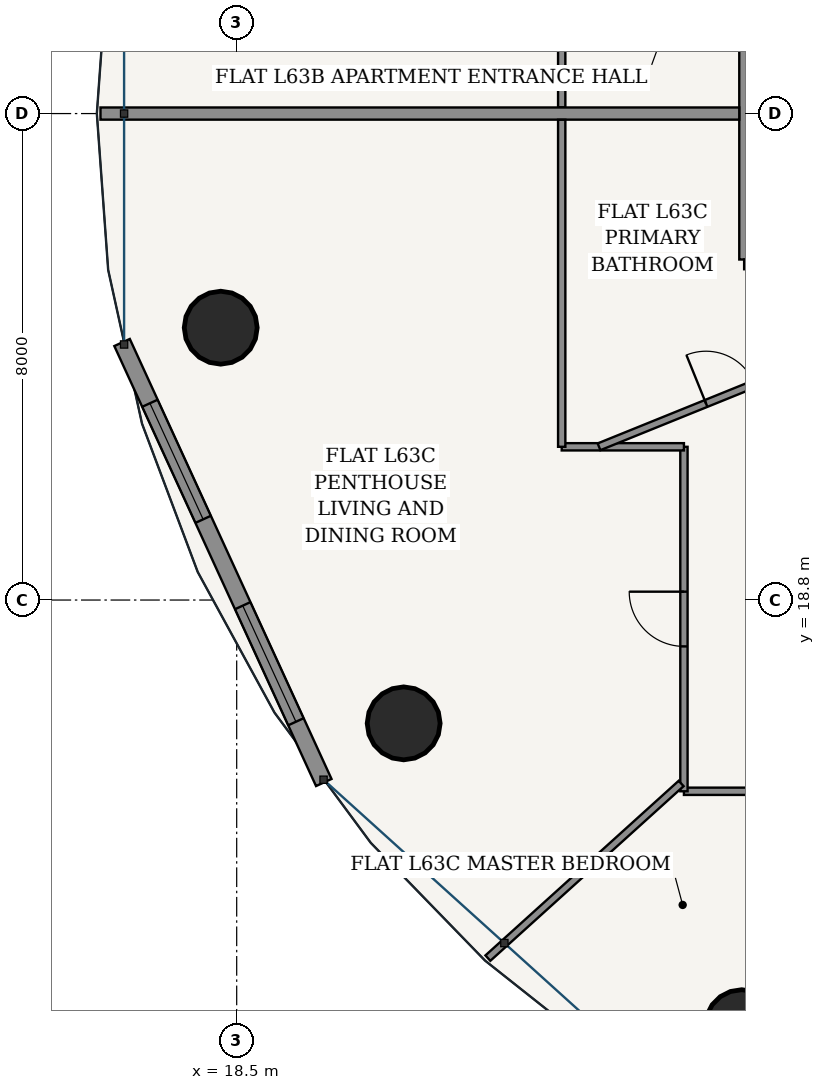
"""IFC4 building model, lengths in metres.
Left out: names, types, materials, properties, quantities, classifications, styles, units other than length and angle.
Written with IfcOpenShell. Run it as: python <this file> out.ifc"""

import sys

from ifc_helpers import new_model, si_unit, direction, frame, frame_2d, origin, origin_2d, place, context, subcontext, project, spatial, rectangle, hollow_circle, extrude, source, transform, mapped, element, fill, save


model = new_model("IFC4")
c1 = context("Model", 3, precision=1e-05, world=origin(), true_north=direction((-0.2419218956, 0.970295726276)))
c2 = subcontext(c1, "Body", "Model", "MODEL_VIEW")
j1 = project(units=[si_unit("LENGTHUNIT", "METRE"), si_unit("PLANEANGLEUNIT", "RADIAN")], contexts=[c1])
p1 = place(None, origin())
s1 = spatial("IfcSite", under=j1, at=p1, CompositionType="ELEMENT")
p2 = place(p1, origin())
s2 = spatial("IfcBuilding", under=s1, at=p2, CompositionType="ELEMENT")
p3 = place(p2, frame((0.0, 0.0, 239.3)))
s3 = spatial("IfcBuildingStorey", under=s2, at=p3, CompositionType="ELEMENT", Elevation=239.3)
for number, where, z_axis, x_axis in (
    (1, (18.237, 23.279, 0.0), (0.0, 0.0, 1.0), (1.0, 0.0, 0.0)),
    (2, (21.246, 16.772, 0.0), (0.0, 0.0, 1.0), (1.0, 0.0, 0.0)),
    (3, (26.805, 11.792, 0.0), (0.0, 0.0, 1.0), (1.0, 0.0, 0.0)),
):
    element("IfcColumn", number, at=place(p3, frame(where, z_axis=z_axis, x_axis=x_axis)), inside=s3, PredefinedType="COLUMN", context=c2, shape_type="SweptSolid", body=[
        extrude(hollow_circle(Radius=0.6, WallThickness=0.038, at=origin_2d()), origin(), (0.0, 0.0, 1.0), 3.7),
    ])
p4 = place(p3, frame((16.615, 23.035, 0.0), z_axis=(0.0, 0.0, 1.0), x_axis=(0.416717018135, -0.909036262641, 0.0)))
e4 = element("IfcWall", 4, at=p4, inside=s3, PredefinedType="SOLIDWALL", context=c2, shape_type="SweptSolid", body=[
    extrude(rectangle(XDim=7.96, YDim=0.28, at=frame_2d((3.98, 0.0))), origin(), (0.0, 0.0, 1.0), 3.25),
])
p5 = place(p4, frame((1.099, 0.0, 0.85)))
e5 = element("IfcOpeningElement", 5, at=p5, cuts=e4, PredefinedType="OPENING", context=c2, shape_type="SweptSolid", body=[
    extrude(rectangle(XDim=2.1, YDim=1.95, at=frame_2d((1.05, 0.975))), frame((0.0, 0.15, 0.0), z_axis=(0.0, -1.0, 0.0), x_axis=(1.0, 0.0, 0.0)), (0.0, 0.0, 1.0), 0.3),
])
p6 = place(p4, frame((4.761, 0.0, 0.85)))
e6 = element("IfcOpeningElement", 6, at=p6, cuts=e4, PredefinedType="OPENING", context=c2, shape_type="SweptSolid", body=[
    extrude(rectangle(XDim=2.1, YDim=1.95, at=frame_2d((1.05, 0.975))), frame((0.0, 0.15, 0.0), z_axis=(0.0, -1.0, 0.0), x_axis=(1.0, 0.0, 0.0)), (0.0, 0.0, 1.0), 0.3),
])
p7 = place(p3, frame((26.845, 24.4, 0.0), z_axis=(0.0, 0.0, 1.0), x_axis=(0.0, 1.0, 0.0)))
e7 = element("IfcWall", 7, at=p7, inside=s3, PredefinedType="PARTITIONING", context=c2, shape_type="SweptSolid", body=[
    extrude(rectangle(XDim=10.625, YDim=0.16, at=frame_2d((5.312, 0.0))), origin(), (0.0, 0.0, 1.0), 2.775),
])
p8 = place(p7, frame((4.936, 0.0, 0.0)))
e8 = element("IfcOpeningElement", 8, at=p8, cuts=e7, PredefinedType="OPENING", context=c2, shape_type="SweptSolid", body=[
    extrude(rectangle(XDim=0.98, YDim=2.2, at=frame_2d((0.49, 1.1))), frame((0.0, 0.09, 0.0), z_axis=(0.0, -1.0, 0.0), x_axis=(1.0, 0.0, 0.0)), (0.0, 0.0, 1.0), 0.18),
])
p9 = place(p3, frame((26.845, 24.32, 0.0), z_axis=(0.0, 0.0, 1.0), x_axis=(1.0, 0.0, 0.0)))
e9 = element("IfcWall", 9, at=p9, inside=s3, PredefinedType="PARTITIONING", context=c2, shape_type="SweptSolid", body=[
    extrude(rectangle(XDim=1.93, YDim=0.16, at=frame_2d((0.965, 0.0))), origin(), (0.0, 0.0, 1.0), 3.25),
])
p10 = place(p3, frame((23.845, 26.902, 0.0), z_axis=(0.0, 0.0, 1.0), x_axis=(0.0, 1.0, 0.0)))
e10 = element("IfcWall", 10, at=p10, inside=s3, PredefinedType="PARTITIONING", context=c2, shape_type="SweptSolid", body=[
    extrude(rectangle(XDim=11.203, YDim=0.12, at=frame_2d((5.602, 0.0))), origin(), (0.0, 0.0, 1.0), 2.775),
])
p11 = place(p10, frame((2.276, 0.0, 0.0)))
e11 = element("IfcOpeningElement", 11, at=p11, cuts=e10, PredefinedType="OPENING", context=c2, shape_type="SweptSolid", body=[
    extrude(rectangle(XDim=0.9, YDim=2.15, at=frame_2d((0.45, 1.075))), frame((0.0, 0.07, 0.0), z_axis=(0.0, -1.0, 0.0), x_axis=(1.0, 0.0, 0.0)), (0.0, 0.0, 1.0), 0.14),
])
p12 = place(p3, frame((26.765, 26.8, 0.0), z_axis=(0.0, 0.0, 1.0), x_axis=(-1.0, 0.0, 0.0)))
e12 = element("IfcWall", 12, at=p12, inside=s3, PredefinedType="PARTITIONING", context=c2, shape_type="SweptSolid", body=[
    extrude(rectangle(XDim=10.505, YDim=0.2, at=frame_2d((5.252, 0.0))), origin(), (0.0, 0.0, 1.0), 2.881),
])
p13 = place(p3, frame((31.32, 15.655, 0.0), z_axis=(0.0, 0.0, 1.0), x_axis=(-1.0, 0.0, 0.0)))
e13 = element("IfcWall", 13, at=p13, inside=s3, PredefinedType="PARTITIONING", context=c2, shape_type="SweptSolid", body=[
    extrude(rectangle(XDim=5.465, YDim=0.12, at=frame_2d((2.732, 0.0))), origin(), (0.0, 0.0, 1.0), 2.775),
])
p14 = place(p3, frame((25.855, 15.655, 0.0), z_axis=(0.0, 0.0, 1.0), x_axis=(0.0, 1.0, 0.0)))
e14 = element("IfcWall", 14, at=p14, inside=s3, PredefinedType="PARTITIONING", context=c2, shape_type="SweptSolid", body=[
    extrude(rectangle(XDim=5.665, YDim=0.12, at=frame_2d((2.833, 0.0))), origin(), (0.0, 0.0, 1.0), 2.775),
])
p15 = place(p14, frame((2.383, 0.0, 0.0)))
e15 = element("IfcOpeningElement", 15, at=p15, cuts=e14, PredefinedType="OPENING", context=c2, shape_type="SweptSolid", body=[
    extrude(rectangle(XDim=0.9, YDim=2.15, at=frame_2d((0.45, 1.075))), frame((0.0, 0.07, 0.0), z_axis=(0.0, -1.0, 0.0), x_axis=(1.0, 0.0, 0.0)), (0.0, 0.0, 1.0), 0.14),
])
p16 = place(p3, frame((25.855, 21.32, 0.0), z_axis=(0.0, 0.0, 1.0), x_axis=(-1.0, 0.0, 0.0)))
e16 = element("IfcWall", 16, at=p16, inside=s3, PredefinedType="PARTITIONING", context=c2, shape_type="SweptSolid", body=[
    extrude(rectangle(XDim=2.01, YDim=0.12, at=frame_2d((1.005, 0.0))), origin(), (0.0, 0.0, 1.0), 2.969),
])
p17 = place(p3, frame((23.845, 21.32, 0.0), z_axis=(0.0, 0.0, 1.0), x_axis=(0.0, 1.0, 0.0)))
e17 = element("IfcWall", 17, at=p17, inside=s3, PredefinedType="PARTITIONING", context=c2, shape_type="SweptSolid", body=[
    extrude(rectangle(XDim=5.378, YDim=0.12, at=frame_2d((2.689, 0.0))), origin(), (0.0, 0.0, 1.0), 2.775),
])
p18 = place(p3, frame((25.809, 15.783, 0.0), z_axis=(0.0, 0.0, 1.0), x_axis=(-0.741938009522, -0.670468485483, 0.0)))
e18 = element("IfcWall", 18, at=p18, inside=s3, PredefinedType="PARTITIONING", context=c2, shape_type="SweptSolid", body=[
    extrude(rectangle(XDim=4.284, YDim=0.12, at=frame_2d((2.142, 0.0))), origin(), (0.0, 0.0, 1.0), 2.881),
])
p19 = place(p3, frame((29.722, 15.605, 0.0), z_axis=(0.0, 0.0, 1.0), x_axis=(-0.594518724985, -0.80408176552, 0.0)))
e19 = element("IfcWall", 19, at=p19, inside=s3, PredefinedType="PARTITIONING", context=c2, shape_type="SweptSolid", body=[
    extrude(rectangle(XDim=6.344, YDim=0.12, at=frame_2d((3.172, 0.0))), origin(), (0.0, 0.0, 1.0), 2.6),
])
p20 = place(p19, frame((1.714, 0.0, 0.0)))
e20 = element("IfcOpeningElement", 20, at=p20, cuts=e19, PredefinedType="OPENING", context=c2, shape_type="SweptSolid", body=[
    extrude(rectangle(XDim=0.9, YDim=2.15, at=frame_2d((0.45, 1.075))), frame((0.0, 0.07, 0.0), z_axis=(0.0, -1.0, 0.0), x_axis=(1.0, 0.0, 0.0)), (0.0, 0.0, 1.0), 0.14),
])
p21 = place(p3, frame((28.775, 23.067, 0.0), z_axis=(0.0, 0.0, 1.0), x_axis=(-0.926979373422, -0.375112304851, 0.0)))
e21 = element("IfcWall", 21, at=p21, inside=s3, PredefinedType="PARTITIONING", context=c2, shape_type="SweptSolid", body=[
    extrude(rectangle(XDim=4.656, YDim=0.12, at=frame_2d((2.328, 0.0))), origin(), (0.0, 0.0, 1.0), 2.969),
])
p22 = place(p21, frame((1.898, 0.0, 0.0)))
e22 = element("IfcOpeningElement", 22, at=p22, cuts=e21, PredefinedType="OPENING", context=c2, shape_type="SweptSolid", body=[
    extrude(rectangle(XDim=0.86, YDim=2.15, at=frame_2d((0.43, 1.075))), frame((0.0, 0.07, 0.0), z_axis=(0.0, -1.0, 0.0), x_axis=(1.0, 0.0, 0.0)), (0.0, 0.0, 1.0), 0.14),
])
m1 = source(origin(), c2, "Body", "SweptSolid", [
    extrude(rectangle(XDim=2.1, YDim=1.95, at=frame_2d((1.05, 0.975))), frame((0.0, 0.03, 0.0), z_axis=(0.0, -1.0, 0.0), x_axis=(1.0, 0.0, 0.0)), (0.0, 0.0, 1.0), 0.06),
])
p23 = place(p5, origin())
e23 = element("IfcWindow", 23, at=p23, inside=s3, PartitioningType="SINGLE_PANEL", PredefinedType="WINDOW", context=c2, shape_type="MappedRepresentation", body=[
    mapped(m1, transform((0.0, 0.0, 0.0), scale=1.0)),
])
fill(e5, e23)
p24 = place(p6, origin())
e24 = element("IfcWindow", 24, at=p24, inside=s3, PartitioningType="SINGLE_PANEL", PredefinedType="WINDOW", context=c2, shape_type="MappedRepresentation", body=[
    mapped(m1, transform((0.0, 0.0, 0.0), scale=1.0)),
])
fill(e6, e24)
m2 = source(origin(), c2, "Body", "SweptSolid", [
    extrude(rectangle(XDim=0.86, YDim=2.15, at=frame_2d((0.43, 1.075))), frame((0.0, 0.025, 0.0), z_axis=(0.0, -1.0, 0.0), x_axis=(1.0, 0.0, 0.0)), (0.0, 0.0, 1.0), 0.05),
])
p25 = place(p22, frame((0.86, 0.0, 0.0), z_axis=(0.0, 0.0, 1.0), x_axis=(-1.0, 0.0, 0.0)))
e25 = element("IfcDoor", 25, at=p25, inside=s3, OperationType="SINGLE_SWING_LEFT", PredefinedType="DOOR", context=c2, shape_type="MappedRepresentation", body=[
    mapped(m2, transform((0.0, 0.0, 0.0), scale=1.0)),
])
fill(e22, e25)
m3 = source(origin(), c2, "Body", "SweptSolid", [
    extrude(rectangle(XDim=0.9, YDim=2.15, at=frame_2d((0.45, 1.075))), frame((0.0, 0.025, 0.0), z_axis=(0.0, -1.0, 0.0), x_axis=(1.0, 0.0, 0.0)), (0.0, 0.0, 1.0), 0.05),
])
p26 = place(p15, origin())
e26 = element("IfcDoor", 26, at=p26, inside=s3, OperationType="SINGLE_SWING_RIGHT", PredefinedType="DOOR", context=c2, shape_type="MappedRepresentation", body=[
    mapped(m3, transform((0.0, 0.0, 0.0), scale=1.0)),
])
fill(e15, e26)
save(model, sys.argv[1])
